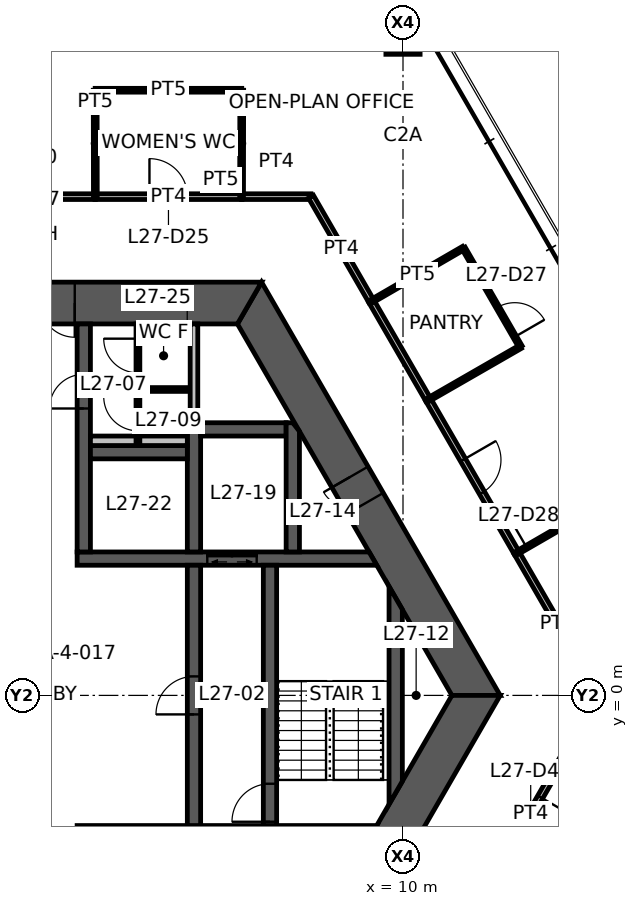
"""IFC4 building model, lengths in metres.
Left out: names, types, materials, properties, quantities, classifications, styles, units other than length and angle.
Written with IfcOpenShell. Run it as: python <this file> out.ifc"""

import sys

from ifc_helpers import new_model, si_unit, direction, frame, frame_2d, origin, origin_2d, place, context, subcontext, project, spatial, polyline, rectangle, hollow_rectangle, outline, extrude, element, fill, save


model = new_model("IFC4")
c1 = context("Model", 3, precision=1e-05, world=origin(), true_north=direction((0.0, 1.0)))
c2 = subcontext(c1, "Body", "Model", "MODEL_VIEW")
j1 = project(units=[si_unit("LENGTHUNIT", "METRE"), si_unit("PLANEANGLEUNIT", "RADIAN")], contexts=[c1])
p1 = place(None, origin())
s1 = spatial("IfcSite", under=j1, at=p1, CompositionType="ELEMENT")
p2 = place(p1, origin())
s2 = spatial("IfcBuilding", under=s1, at=p2, CompositionType="ELEMENT")
p3 = place(p2, frame((0.0, 0.0, 108.0)))
s3 = spatial("IfcBuildingStorey", under=s2, at=p3, CompositionType="ELEMENT", Elevation=108.0)
p4 = place(p3, frame((10.0, 17.321, 0.0), z_axis=(0.0, 0.0, 1.0), x_axis=(1.0, 0.0, 0.0)))
e1 = element("IfcColumn", 1, at=p4, inside=s3, PredefinedType="COLUMN", context=c2, shape_type="SweptSolid", body=[
    extrude(hollow_rectangle(XDim=0.9, YDim=0.9, WallThickness=0.055, at=origin_2d()), origin(), (0.0, 0.0, 1.0), 3.9),
])
p5 = place(p3, frame((11.922, 0.0, 0.0), z_axis=(0.0, 0.0, 1.0), x_axis=(-0.500004296715, 0.866022923061, 0.0)))
e2 = element("IfcWall", 2, at=p5, inside=s3, PredefinedType="SHEAR", context=c2, shape_type="SweptSolid", body=[
    extrude(outline(polyline([(-0.318, -0.55), (5.835, -0.55), (6.635, -0.55), (12.24, -0.55), (11.605, 0.55), (6.635, 0.55), (5.835, 0.55), (0.318, 0.55), (-0.318, -0.55)])), origin(), (0.0, 0.0, 1.0), 3.9),
])
p6 = place(p5, frame((5.835, 0.0, 0.0)))
e3 = element("IfcOpeningElement", 3, at=p6, cuts=e2, PredefinedType="OPENING", context=c2, shape_type="SweptSolid", body=[
    extrude(rectangle(XDim=0.8, YDim=2.1, at=frame_2d((0.4, 1.05))), frame((0.0, 0.56, 0.0), z_axis=(0.0, -1.0, 0.0), x_axis=(1.0, 0.0, 0.0)), (0.0, 0.0, 1.0), 1.12),
])
p7 = place(p3, frame((5.961, 10.325, 0.0), z_axis=(0.0, 0.0, 1.0), x_axis=(-1.0, 0.0, 0.0)))
e4 = element("IfcWall", 4, at=p7, inside=s3, PredefinedType="SHEAR", context=c2, shape_type="SweptSolid", body=[
    extrude(outline(polyline([(-0.318, -0.55), (4.599, -0.55), (5.499, -0.55), (6.424, -0.55), (7.323, -0.55), (12.24, -0.55), (11.605, 0.55), (7.323, 0.55), (6.424, 0.55), (5.499, 0.55), (4.599, 0.55), (0.318, 0.55), (-0.318, -0.55)])), origin(), (0.0, 0.0, 1.0), 3.9),
])
p8 = place(p7, frame((6.424, 0.0, 0.0)))
e5 = element("IfcOpeningElement", 5, at=p8, cuts=e4, PredefinedType="OPENING", context=c2, shape_type="SweptSolid", body=[
    extrude(rectangle(XDim=0.9, YDim=2.1, at=frame_2d((0.45, 1.05))), frame((0.0, 0.56, 0.0), z_axis=(0.0, -1.0, 0.0), x_axis=(1.0, 0.0, 0.0)), (0.0, 0.0, 1.0), 1.12),
])
p9 = place(p7, frame((4.599, 0.0, 0.0)))
e6 = element("IfcOpeningElement", 6, at=p9, cuts=e4, PredefinedType="OPENING", context=c2, shape_type="SweptSolid", body=[
    extrude(rectangle(XDim=0.9, YDim=2.1, at=frame_2d((0.45, 1.05))), frame((0.0, 0.56, 0.0), z_axis=(0.0, -1.0, 0.0), x_axis=(1.0, 0.0, 0.0)), (0.0, 0.0, 1.0), 1.12),
])
p10 = place(p3, frame((5.961, -10.325, 0.0), z_axis=(0.0, 0.0, 1.0), x_axis=(0.500004296715, 0.866022923061, 0.0)))
e7 = element("IfcWall", 7, at=p10, inside=s3, PredefinedType="SHEAR", context=c2, shape_type="SweptSolid", body=[
    extrude(outline(polyline([(-0.318, -0.55), (4.594, -0.55), (5.394, -0.55), (12.24, -0.55), (11.605, 0.55), (5.394, 0.55), (4.594, 0.55), (0.318, 0.55), (-0.318, -0.55)])), origin(), (0.0, 0.0, 1.0), 3.9),
])
p11 = place(p10, frame((4.594, 0.0, 0.0)))
e8 = element("IfcOpeningElement", 8, at=p11, cuts=e7, PredefinedType="OPENING", context=c2, shape_type="SweptSolid", body=[
    extrude(rectangle(XDim=0.8, YDim=2.1, at=frame_2d((0.4, 1.05))), frame((0.0, 0.56, 0.0), z_axis=(0.0, -1.0, 0.0), x_axis=(1.0, 0.0, 0.0)), (0.0, 0.0, 1.0), 1.12),
])
p12 = place(p3, frame((1.425, 3.6, 0.0), z_axis=(0.0, 0.0, 1.0), x_axis=(1.0, 0.0, 0.0)))
e9 = element("IfcWall", 9, at=p12, inside=s3, PredefinedType="SHEAR", context=c2, shape_type="SweptSolid", body=[
    extrude(outline(polyline([(0.0, -0.175), (3.425, -0.175), (4.725, -0.175), (7.885, -0.175), (7.683, 0.175), (4.725, 0.175), (3.425, 0.175), (0.0, 0.175), (0.0, -0.175)])), origin(), (0.0, 0.0, 1.0), 3.9),
])
p13 = place(p12, frame((3.425, 0.0, 0.0)))
e10 = element("IfcOpeningElement", 10, at=p13, cuts=e9, PredefinedType="OPENING", context=c2, shape_type="SweptSolid", body=[
    extrude(rectangle(XDim=1.3, YDim=2.1, at=frame_2d((0.65, 1.05))), frame((0.0, 0.185, 0.0), z_axis=(0.0, -1.0, 0.0), x_axis=(1.0, 0.0, 0.0)), (0.0, 0.0, 1.0), 0.37),
])
p14 = place(p3, frame((1.425, -3.6, 0.0), z_axis=(0.0, 0.0, 1.0), x_axis=(1.0, 0.0, 0.0)))
e11 = element("IfcWall", 11, at=p14, inside=s3, PredefinedType="SHEAR", context=c2, shape_type="SweptSolid", body=[
    extrude(outline(polyline([(0.0, -0.175), (1.075, -0.175), (2.175, -0.175), (7.683, -0.175), (7.885, 0.175), (2.175, 0.175), (1.075, 0.175), (0.0, 0.175), (0.0, -0.175)])), origin(), (0.0, 0.0, 1.0), 3.9),
])
p15 = place(p14, frame((1.075, 0.0, 0.0)))
e12 = element("IfcOpeningElement", 12, at=p15, cuts=e11, PredefinedType="OPENING", context=c2, shape_type="SweptSolid", body=[
    extrude(rectangle(XDim=1.1, YDim=2.1, at=frame_2d((0.55, 1.05))), frame((0.0, 0.185, 0.0), z_axis=(0.0, -1.0, 0.0), x_axis=(1.0, 0.0, 0.0)), (0.0, 0.0, 1.0), 0.37),
])
p16 = place(p3, frame((1.6, 3.775, 0.0), z_axis=(0.0, 0.0, 1.0), x_axis=(0.0, 1.0, 0.0)))
e13 = element("IfcWall", 13, at=p16, inside=s3, PredefinedType="SHEAR", context=c2, shape_type="SweptSolid", body=[
    extrude(rectangle(XDim=6.0, YDim=0.35, at=frame_2d((3.0, 0.0))), origin(), (0.0, 0.0, 1.0), 3.9),
])
p17 = place(p16, frame((3.775, 0.0, 0.0)))
e14 = element("IfcOpeningElement", 14, at=p17, cuts=e13, PredefinedType="OPENING", context=c2, shape_type="SweptSolid", body=[
    extrude(rectangle(XDim=0.9, YDim=2.1, at=frame_2d((0.45, 1.05))), frame((0.0, 0.185, 0.0), z_axis=(0.0, -1.0, 0.0), x_axis=(1.0, 0.0, 0.0)), (0.0, 0.0, 1.0), 0.37),
])
p18 = place(p3, frame((4.5, -3.425, 0.0), z_axis=(0.0, 0.0, 1.0), x_axis=(0.0, 1.0, 0.0)))
e15 = element("IfcWall", 15, at=p18, inside=s3, PredefinedType="SHEAR", context=c2, shape_type="SweptSolid", body=[
    extrude(rectangle(XDim=6.85, YDim=0.35, at=frame_2d((3.425, 0.0))), origin(), (0.0, 0.0, 1.0), 3.9),
])
p19 = place(p18, frame((2.925, 0.0, 0.0)))
e16 = element("IfcOpeningElement", 16, at=p19, cuts=e15, PredefinedType="OPENING", context=c2, shape_type="SweptSolid", body=[
    extrude(rectangle(XDim=1.0, YDim=2.1, at=frame_2d((0.5, 1.05))), frame((0.0, 0.185, 0.0), z_axis=(0.0, -1.0, 0.0), x_axis=(1.0, 0.0, 0.0)), (0.0, 0.0, 1.0), 0.37),
])
p20 = place(p3, frame((6.5, -3.425, 0.0), z_axis=(0.0, 0.0, 1.0), x_axis=(0.0, 1.0, 0.0)))
e17 = element("IfcWall", 17, at=p20, inside=s3, PredefinedType="SHEAR", context=c2, shape_type="SweptSolid", body=[
    extrude(rectangle(XDim=6.85, YDim=0.35, at=frame_2d((3.425, 0.0))), origin(), (0.0, 0.0, 1.0), 3.9),
])
p21 = place(p20, frame((0.1, 0.0, 0.0)))
e18 = element("IfcOpeningElement", 18, at=p21, cuts=e17, PredefinedType="OPENING", context=c2, shape_type="SweptSolid", body=[
    extrude(rectangle(XDim=1.0, YDim=2.1, at=frame_2d((0.5, 1.05))), frame((0.0, 0.185, 0.0), z_axis=(0.0, -1.0, 0.0), x_axis=(1.0, 0.0, 0.0)), (0.0, 0.0, 1.0), 0.37),
])
p22 = place(p3, frame((4.5, 3.775, 0.0), z_axis=(0.0, 0.0, 1.0), x_axis=(0.0, 1.0, 0.0)))
e19 = element("IfcWall", 19, at=p22, inside=s3, PredefinedType="SHEAR", context=c2, shape_type="SweptSolid", body=[
    extrude(rectangle(XDim=3.4, YDim=0.35, at=frame_2d((1.7, 0.0))), origin(), (0.0, 0.0, 1.0), 3.9),
])
p23 = place(p3, frame((1.775, 6.4, 0.0), z_axis=(0.0, 0.0, 1.0), x_axis=(1.0, 0.0, 0.0)))
e20 = element("IfcWall", 20, at=p23, inside=s3, PredefinedType="SHEAR", context=c2, shape_type="SweptSolid", body=[
    extrude(rectangle(XDim=2.55, YDim=0.35, at=frame_2d((1.275, 0.0))), origin(), (0.0, 0.0, 1.0), 3.9),
])
p24 = place(p3, frame((4.675, 7.0, 0.0), z_axis=(0.0, 0.0, 1.0), x_axis=(1.0, 0.0, 0.0)))
e21 = element("IfcWall", 21, at=p24, inside=s3, PredefinedType="SHEAR", context=c2, shape_type="SweptSolid", body=[
    extrude(rectangle(XDim=2.25, YDim=0.35, at=frame_2d((1.125, 0.0))), origin(), (0.0, 0.0, 1.0), 3.9),
])
p25 = place(p3, frame((7.1, 3.775, 0.0), z_axis=(0.0, 0.0, 1.0), x_axis=(0.0, 1.0, 0.0)))
e22 = element("IfcWall", 22, at=p25, inside=s3, PredefinedType="SHEAR", context=c2, shape_type="SweptSolid", body=[
    extrude(outline(polyline([(0.0, -0.175), (3.175, -0.175), (3.4, 0.0), (3.4, 0.175), (0.0, 0.175), (0.0, -0.175)])), origin(), (0.0, 0.0, 1.0), 3.9),
])
p26 = place(p3, frame((9.808, -2.562, 0.0), z_axis=(0.0, 0.0, 1.0), x_axis=(0.0, 1.0, 0.0)))
e23 = element("IfcWall", 23, at=p26, inside=s3, PredefinedType="SHEAR", context=c2, shape_type="SweptSolid", body=[
    extrude(outline(polyline([(0.303, -0.175), (4.821, -0.175), (5.428, 0.175), (-0.303, 0.175), (0.303, -0.175)])), origin(), (0.0, 0.0, 1.0), 3.9),
])
p27 = place(p3, frame((4.5, 7.175, 0.0), z_axis=(0.0, 0.0, 1.0), x_axis=(0.0, 1.0, 0.0)))
e24 = element("IfcWall", 24, at=p27, inside=s3, PredefinedType="STANDARD", context=c2, shape_type="SweptSolid", body=[
    extrude(rectangle(XDim=2.6, YDim=0.2, at=frame_2d((1.3, 0.0))), origin(), (0.0, 0.0, 1.0), 3.9),
])
p28 = place(p3, frame((1.775, 6.7, 0.0), z_axis=(0.0, 0.0, 1.0), x_axis=(1.0, 0.0, 0.0)))
e25 = element("IfcWall", 25, at=p28, inside=s3, PredefinedType="PLUMBINGWALL", context=c2, shape_type="SweptSolid", body=[
    extrude(rectangle(XDim=2.55, YDim=0.25, at=frame_2d((1.275, 0.0))), origin(), (0.0, 0.0, 1.0), 3.9),
])
p29 = place(p3, frame((3.025, 6.575, 0.0), z_axis=(0.0, 0.0, 1.0), x_axis=(0.0, 1.0, 0.0)))
e26 = element("IfcWall", 26, at=p29, inside=s3, PredefinedType="PARTITIONING", context=c2, shape_type="SweptSolid", body=[
    extrude(rectangle(XDim=3.2, YDim=0.1, at=frame_2d((1.6, 0.0))), origin(), (0.0, 0.0, 1.0), 2.95),
])
p30 = place(p29, frame((1.913, 0.0, 0.0)))
e27 = element("IfcOpeningElement", 27, at=p30, cuts=e26, PredefinedType="OPENING", context=c2, shape_type="SweptSolid", body=[
    extrude(rectangle(XDim=0.9, YDim=2.1, at=frame_2d((0.45, 1.05))), frame((0.0, 0.06, 0.0), z_axis=(0.0, -1.0, 0.0), x_axis=(1.0, 0.0, 0.0)), (0.0, 0.0, 1.0), 0.12),
])
p31 = place(p29, frame((0.387, 0.0, 0.0)))
e28 = element("IfcOpeningElement", 28, at=p31, cuts=e26, PredefinedType="OPENING", context=c2, shape_type="SweptSolid", body=[
    extrude(rectangle(XDim=0.9, YDim=2.1, at=frame_2d((0.45, 1.05))), frame((0.0, 0.06, 0.0), z_axis=(0.0, -1.0, 0.0), x_axis=(1.0, 0.0, 0.0)), (0.0, 0.0, 1.0), 0.12),
])
p32 = place(p3, frame((3.075, 8.05, 0.0), z_axis=(0.0, 0.0, 1.0), x_axis=(1.0, 0.0, 0.0)))
e29 = element("IfcWall", 29, at=p32, inside=s3, PredefinedType="PARTITIONING", context=c2, shape_type="SweptSolid", body=[
    extrude(rectangle(XDim=1.25, YDim=0.1, at=frame_2d((0.625, 0.0))), origin(), (0.0, 0.0, 1.0), 2.95),
])
p33 = place(p3, frame((1.895, 13.125, 0.0), z_axis=(0.0, 0.0, 1.0), x_axis=(1.0, 0.0, 0.0)))
e30 = element("IfcWall", 30, at=p33, inside=s3, PredefinedType="PARTITIONING", context=c2, shape_type="SweptSolid", body=[
    extrude(rectangle(XDim=3.867, YDim=0.15, at=frame_2d((1.934, 0.0))), origin(), (0.0, 0.0, 1.0), 2.95),
])
p34 = place(p33, frame((1.434, 0.0, 0.0)))
e31 = element("IfcOpeningElement", 31, at=p34, cuts=e30, PredefinedType="OPENING", context=c2, shape_type="SweptSolid", body=[
    extrude(rectangle(XDim=1.0, YDim=2.1, at=frame_2d((0.5, 1.05))), frame((0.0, 0.085, 0.0), z_axis=(0.0, -1.0, 0.0), x_axis=(1.0, 0.0, 0.0)), (0.0, 0.0, 1.0), 0.17),
])
p35 = place(p3, frame((9.164, 10.377, 0.0), z_axis=(0.0, 0.0, 1.0), x_axis=(0.500038395149, -0.8660032352, 0.0)))
e32 = element("IfcWall", 32, at=p35, inside=s3, PredefinedType="PARTITIONING", context=c2, shape_type="SweptSolid", body=[
    extrude(rectangle(XDim=3.01, YDim=0.15, at=frame_2d((1.505, 0.0))), origin(), (0.0, 0.0, 1.0), 2.95),
])
p36 = place(p3, frame((12.987, 3.755, 0.0), z_axis=(0.0, 0.0, 1.0), x_axis=(0.499980509014, -0.866036656618, 0.0)))
e33 = element("IfcWall", 33, at=p36, inside=s3, PredefinedType="PARTITIONING", context=c2, shape_type="SweptSolid", body=[
    extrude(rectangle(XDim=4.313, YDim=0.15, at=frame_2d((2.157, 0.0))), origin(), (0.0, 0.0, 1.0), 2.95),
])
p37 = place(p3, frame((0.42, 13.125, 0.0), z_axis=(0.0, 0.0, 1.0), x_axis=(1.0, 0.0, 0.0)))
e34 = element("IfcWall", 34, at=p37, inside=s3, PredefinedType="PARTITIONING", context=c2, shape_type="SweptSolid", body=[
    extrude(rectangle(XDim=1.485, YDim=0.15, at=frame_2d((0.742, 0.0))), origin(), (0.0, 0.0, 1.0), 2.95),
])
p38 = place(p3, frame((5.752, 13.125, 0.0), z_axis=(0.0, 0.0, 1.0), x_axis=(1.0, 0.0, 0.0)))
e35 = element("IfcWall", 35, at=p38, inside=s3, PredefinedType="PARTITIONING", context=c2, shape_type="SweptSolid", body=[
    extrude(rectangle(XDim=1.825, YDim=0.15, at=frame_2d((0.913, 0.0))), origin(), (0.0, 0.0, 1.0), 2.95),
])
p39 = place(p3, frame((7.578, 13.125, 0.0), z_axis=(0.0, 0.0, 1.0), x_axis=(0.499992528944, -0.866029717158, 0.0)))
e36 = element("IfcWall", 36, at=p39, inside=s3, PredefinedType="PARTITIONING", context=c2, shape_type="SweptSolid", body=[
    extrude(rectangle(XDim=3.182, YDim=0.15, at=frame_2d((1.591, 0.0))), origin(), (0.0, 0.0, 1.0), 2.95),
])
p40 = place(p3, frame((10.664, 7.779, 0.0), z_axis=(0.0, 0.0, 1.0), x_axis=(0.500008456887, -0.866020521143, 0.0)))
e37 = element("IfcWall", 37, at=p40, inside=s3, PredefinedType="PARTITIONING", context=c2, shape_type="SweptSolid", body=[
    extrude(rectangle(XDim=4.655, YDim=0.15, at=frame_2d((2.328, 0.0))), origin(), (0.0, 0.0, 1.0), 2.95),
])
p41 = place(p40, frame((1.828, 0.0, 0.0)))
e38 = element("IfcOpeningElement", 38, at=p41, cuts=e37, PredefinedType="OPENING", context=c2, shape_type="SweptSolid", body=[
    extrude(rectangle(XDim=1.0, YDim=2.1, at=frame_2d((0.5, 1.05))), frame((0.0, 0.085, 0.0), z_axis=(0.0, -1.0, 0.0), x_axis=(1.0, 0.0, 0.0)), (0.0, 0.0, 1.0), 0.17),
])
p42 = place(p3, frame((1.9, 15.925, 0.0), z_axis=(0.0, 0.0, 1.0), x_axis=(1.0, 0.0, 0.0)))
e39 = element("IfcWall", 39, at=p42, inside=s3, PredefinedType="PARTITIONING", context=c2, shape_type="SweptSolid", body=[
    extrude(rectangle(XDim=3.857, YDim=0.1, at=frame_2d((1.929, 0.0))), origin(), (0.0, 0.0, 1.0), 2.95),
])
for number, where, z_axis, x_axis in (
    (40, (1.905, 13.125, 0.0), (0.0, 0.0, 1.0), (-0.002, 1.0, 0.0)),
    (41, (5.757, 15.925, 0.0), (0.0, 0.0, 1.0), (-0.002, -1.0, 0.0)),
    (42, (9.169, 10.369, 0.0), (0.0, 0.0, 1.0), (0.865, 0.501, 0.0)),
):
    element("IfcWall", number, at=place(p3, frame(where, z_axis=z_axis, x_axis=x_axis)), inside=s3, PredefinedType="PARTITIONING", context=c2, shape_type="SweptSolid", body=[
        extrude(rectangle(XDim=2.8, YDim=0.1, at=frame_2d((1.4, 0.0))), origin(), (0.0, 0.0, 1.0), 2.95),
    ])
p43 = place(p3, frame((11.592, 11.773, 0.0), z_axis=(0.0, 0.0, 1.0), x_axis=(0.499990139034, -0.866031096941, 0.0)))
e43 = element("IfcWall", 43, at=p43, inside=s3, PredefinedType="PARTITIONING", context=c2, shape_type="SweptSolid", body=[
    extrude(rectangle(XDim=3.0, YDim=0.1, at=frame_2d((1.5, 0.0))), origin(), (0.0, 0.0, 1.0), 2.95),
])
p44 = place(p43, frame((1.8, 0.0, 0.0)))
e44 = element("IfcOpeningElement", 44, at=p44, cuts=e43, PredefinedType="OPENING", context=c2, shape_type="SweptSolid", body=[
    extrude(rectangle(XDim=0.9, YDim=2.1, at=frame_2d((0.45, 1.05))), frame((0.0, 0.06, 0.0), z_axis=(0.0, -1.0, 0.0), x_axis=(1.0, 0.0, 0.0)), (0.0, 0.0, 1.0), 0.12),
])
p45 = place(p3, frame((13.092, 9.175, 0.0), z_axis=(0.0, 0.0, 1.0), x_axis=(-0.866855433567, -0.498559582492, 0.0)))
e45 = element("IfcWall", 45, at=p45, inside=s3, PredefinedType="PARTITIONING", context=c2, shape_type="SweptSolid", body=[
    extrude(rectangle(XDim=2.8, YDim=0.1, at=frame_2d((1.4, 0.0))), origin(), (0.0, 0.0, 1.0), 2.95),
])
p46 = place(p3, frame((12.992, 3.747, 0.0), z_axis=(0.0, 0.0, 1.0), x_axis=(0.865555596133, 0.500812849279, 0.0)))
e46 = element("IfcWall", 46, at=p46, inside=s3, PredefinedType="PARTITIONING", context=c2, shape_type="SweptSolid", body=[
    extrude(rectangle(XDim=4.696, YDim=0.1, at=frame_2d((2.348, 0.0))), origin(), (0.0, 0.0, 1.0), 2.95),
])
p47 = place(p46, frame((0.3, 0.0, 0.0)))
e47 = element("IfcOpeningElement", 47, at=p47, cuts=e46, PredefinedType="OPENING", context=c2, shape_type="SweptSolid", body=[
    extrude(rectangle(XDim=0.9, YDim=2.1, at=frame_2d((0.45, 1.05))), frame((0.0, 0.06, 0.0), z_axis=(0.0, -1.0, 0.0), x_axis=(1.0, 0.0, 0.0)), (0.0, 0.0, 1.0), 0.12),
])
p48 = place(p3, frame((15.144, -0.02, 0.0), z_axis=(0.0, 0.0, 1.0), x_axis=(-0.499985098601, -0.86603400694, 0.0)))
e48 = element("IfcWall", 48, at=p48, inside=s3, PredefinedType="PARTITIONING", context=c2, shape_type="SweptSolid", body=[
    extrude(rectangle(XDim=7.135, YDim=0.15, at=frame_2d((3.567, 0.0))), origin(), (0.0, 0.0, 1.0), 2.95),
])
p49 = place(p48, frame((3.067, 0.0, 0.0)))
e49 = element("IfcOpeningElement", 49, at=p49, cuts=e48, PredefinedType="OPENING", context=c2, shape_type="SweptSolid", body=[
    extrude(rectangle(XDim=1.0, YDim=2.1, at=frame_2d((0.5, 1.05))), frame((0.0, 0.085, 0.0), z_axis=(0.0, -1.0, 0.0), x_axis=(1.0, 0.0, 0.0)), (0.0, 0.0, 1.0), 0.17),
])
p50 = place(p9, origin())
e50 = element("IfcDoor", 50, at=p50, inside=s3, OperationType="SINGLE_SWING_LEFT", PredefinedType="DOOR", context=c2, shape_type="SweptSolid", body=[
    extrude(rectangle(XDim=0.9, YDim=2.1, at=frame_2d((0.45, 1.05))), frame((0.0, 0.025, 0.0), z_axis=(0.0, -1.0, 0.0), x_axis=(1.0, 0.0, 0.0)), (0.0, 0.0, 1.0), 0.05),
])
fill(e6, e50)
p51 = place(p6, origin())
e51 = element("IfcDoor", 51, at=p51, inside=s3, OperationType="SINGLE_SWING_RIGHT", PredefinedType="DOOR", context=c2, shape_type="SweptSolid", body=[
    extrude(rectangle(XDim=0.8, YDim=2.1, at=frame_2d((0.4, 1.05))), frame((0.0, 0.025, 0.0), z_axis=(0.0, -1.0, 0.0), x_axis=(1.0, 0.0, 0.0)), (0.0, 0.0, 1.0), 0.05),
])
fill(e3, e51)
p52 = place(p19, origin())
e52 = element("IfcDoor", 52, at=p52, inside=s3, OperationType="SINGLE_SWING_LEFT", PredefinedType="DOOR", context=c2, shape_type="SweptSolid", body=[
    extrude(rectangle(XDim=1.0, YDim=2.1, at=frame_2d((0.5, 1.05))), frame((0.0, 0.025, 0.0), z_axis=(0.0, -1.0, 0.0), x_axis=(1.0, 0.0, 0.0)), (0.0, 0.0, 1.0), 0.05),
])
fill(e16, e52)
p53 = place(p21, origin())
e53 = element("IfcDoor", 53, at=p53, inside=s3, OperationType="SINGLE_SWING_LEFT", PredefinedType="DOOR", context=c2, shape_type="SweptSolid", body=[
    extrude(rectangle(XDim=1.0, YDim=2.1, at=frame_2d((0.5, 1.05))), frame((0.0, 0.025, 0.0), z_axis=(0.0, -1.0, 0.0), x_axis=(1.0, 0.0, 0.0)), (0.0, 0.0, 1.0), 0.05),
])
fill(e18, e53)
p54 = place(p17, origin())
e54 = element("IfcDoor", 54, at=p54, inside=s3, OperationType="SINGLE_SWING_LEFT", PredefinedType="DOOR", context=c2, shape_type="SweptSolid", body=[
    extrude(rectangle(XDim=0.9, YDim=2.1, at=frame_2d((0.45, 1.05))), frame((0.0, 0.025, 0.0), z_axis=(0.0, -1.0, 0.0), x_axis=(1.0, 0.0, 0.0)), (0.0, 0.0, 1.0), 0.05),
])
fill(e14, e54)
p55 = place(p30, origin())
e55 = element("IfcDoor", 55, at=p55, inside=s3, OperationType="SINGLE_SWING_RIGHT", PredefinedType="DOOR", context=c2, shape_type="SweptSolid", body=[
    extrude(rectangle(XDim=0.9, YDim=2.1, at=frame_2d((0.45, 1.05))), frame((0.0, 0.025, 0.0), z_axis=(0.0, -1.0, 0.0), x_axis=(1.0, 0.0, 0.0)), (0.0, 0.0, 1.0), 0.05),
])
fill(e27, e55)
p56 = place(p31, origin())
e56 = element("IfcDoor", 56, at=p56, inside=s3, OperationType="SINGLE_SWING_RIGHT", PredefinedType="DOOR", context=c2, shape_type="SweptSolid", body=[
    extrude(rectangle(XDim=0.9, YDim=2.1, at=frame_2d((0.45, 1.05))), frame((0.0, 0.025, 0.0), z_axis=(0.0, -1.0, 0.0), x_axis=(1.0, 0.0, 0.0)), (0.0, 0.0, 1.0), 0.05),
])
fill(e28, e56)
p57 = place(p34, origin())
e57 = element("IfcDoor", 57, at=p57, inside=s3, OperationType="SINGLE_SWING_LEFT", PredefinedType="DOOR", context=c2, shape_type="SweptSolid", body=[
    extrude(rectangle(XDim=1.0, YDim=2.1, at=frame_2d((0.5, 1.05))), frame((0.0, 0.025, 0.0), z_axis=(0.0, -1.0, 0.0), x_axis=(1.0, 0.0, 0.0)), (0.0, 0.0, 1.0), 0.05),
])
fill(e31, e57)
p58 = place(p41, origin())
e58 = element("IfcDoor", 58, at=p58, inside=s3, OperationType="SINGLE_SWING_LEFT", PredefinedType="DOOR", context=c2, shape_type="SweptSolid", body=[
    extrude(rectangle(XDim=1.0, YDim=2.1, at=frame_2d((0.5, 1.05))), frame((0.0, 0.025, 0.0), z_axis=(0.0, -1.0, 0.0), x_axis=(1.0, 0.0, 0.0)), (0.0, 0.0, 1.0), 0.05),
])
fill(e38, e58)
p59 = place(p44, origin())
e59 = element("IfcDoor", 59, at=p59, inside=s3, OperationType="SINGLE_SWING_RIGHT", PredefinedType="DOOR", context=c2, shape_type="SweptSolid", body=[
    extrude(rectangle(XDim=0.9, YDim=2.1, at=frame_2d((0.45, 1.05))), frame((0.0, 0.025, 0.0), z_axis=(0.0, -1.0, 0.0), x_axis=(1.0, 0.0, 0.0)), (0.0, 0.0, 1.0), 0.05),
])
fill(e44, e59)
p60 = place(p47, origin())
e60 = element("IfcDoor", 60, at=p60, inside=s3, OperationType="SINGLE_SWING_LEFT", PredefinedType="DOOR", context=c2, shape_type="SweptSolid", body=[
    extrude(rectangle(XDim=0.9, YDim=2.1, at=frame_2d((0.45, 1.05))), frame((0.0, 0.025, 0.0), z_axis=(0.0, -1.0, 0.0), x_axis=(1.0, 0.0, 0.0)), (0.0, 0.0, 1.0), 0.05),
])
fill(e47, e60)
p61 = place(p49, origin())
e61 = element("IfcDoor", 61, at=p61, inside=s3, OperationType="SINGLE_SWING_LEFT", PredefinedType="DOOR", context=c2, shape_type="SweptSolid", body=[
    extrude(rectangle(XDim=1.0, YDim=2.1, at=frame_2d((0.5, 1.05))), frame((0.0, 0.025, 0.0), z_axis=(0.0, -1.0, 0.0), x_axis=(1.0, 0.0, 0.0)), (0.0, 0.0, 1.0), 0.05),
])
fill(e49, e61)
p62 = place(p13, origin())
e62 = element("IfcDoor", 62, at=p62, inside=s3, OperationType="DOUBLE_DOOR_SLIDING", PredefinedType="DOOR", context=c2, shape_type="SweptSolid", body=[
    extrude(rectangle(XDim=1.3, YDim=2.1, at=frame_2d((0.65, 1.05))), frame((0.0, 0.025, 0.0), z_axis=(0.0, -1.0, 0.0), x_axis=(1.0, 0.0, 0.0)), (0.0, 0.0, 1.0), 0.05),
])
fill(e10, e62)
save(model, sys.argv[1])
